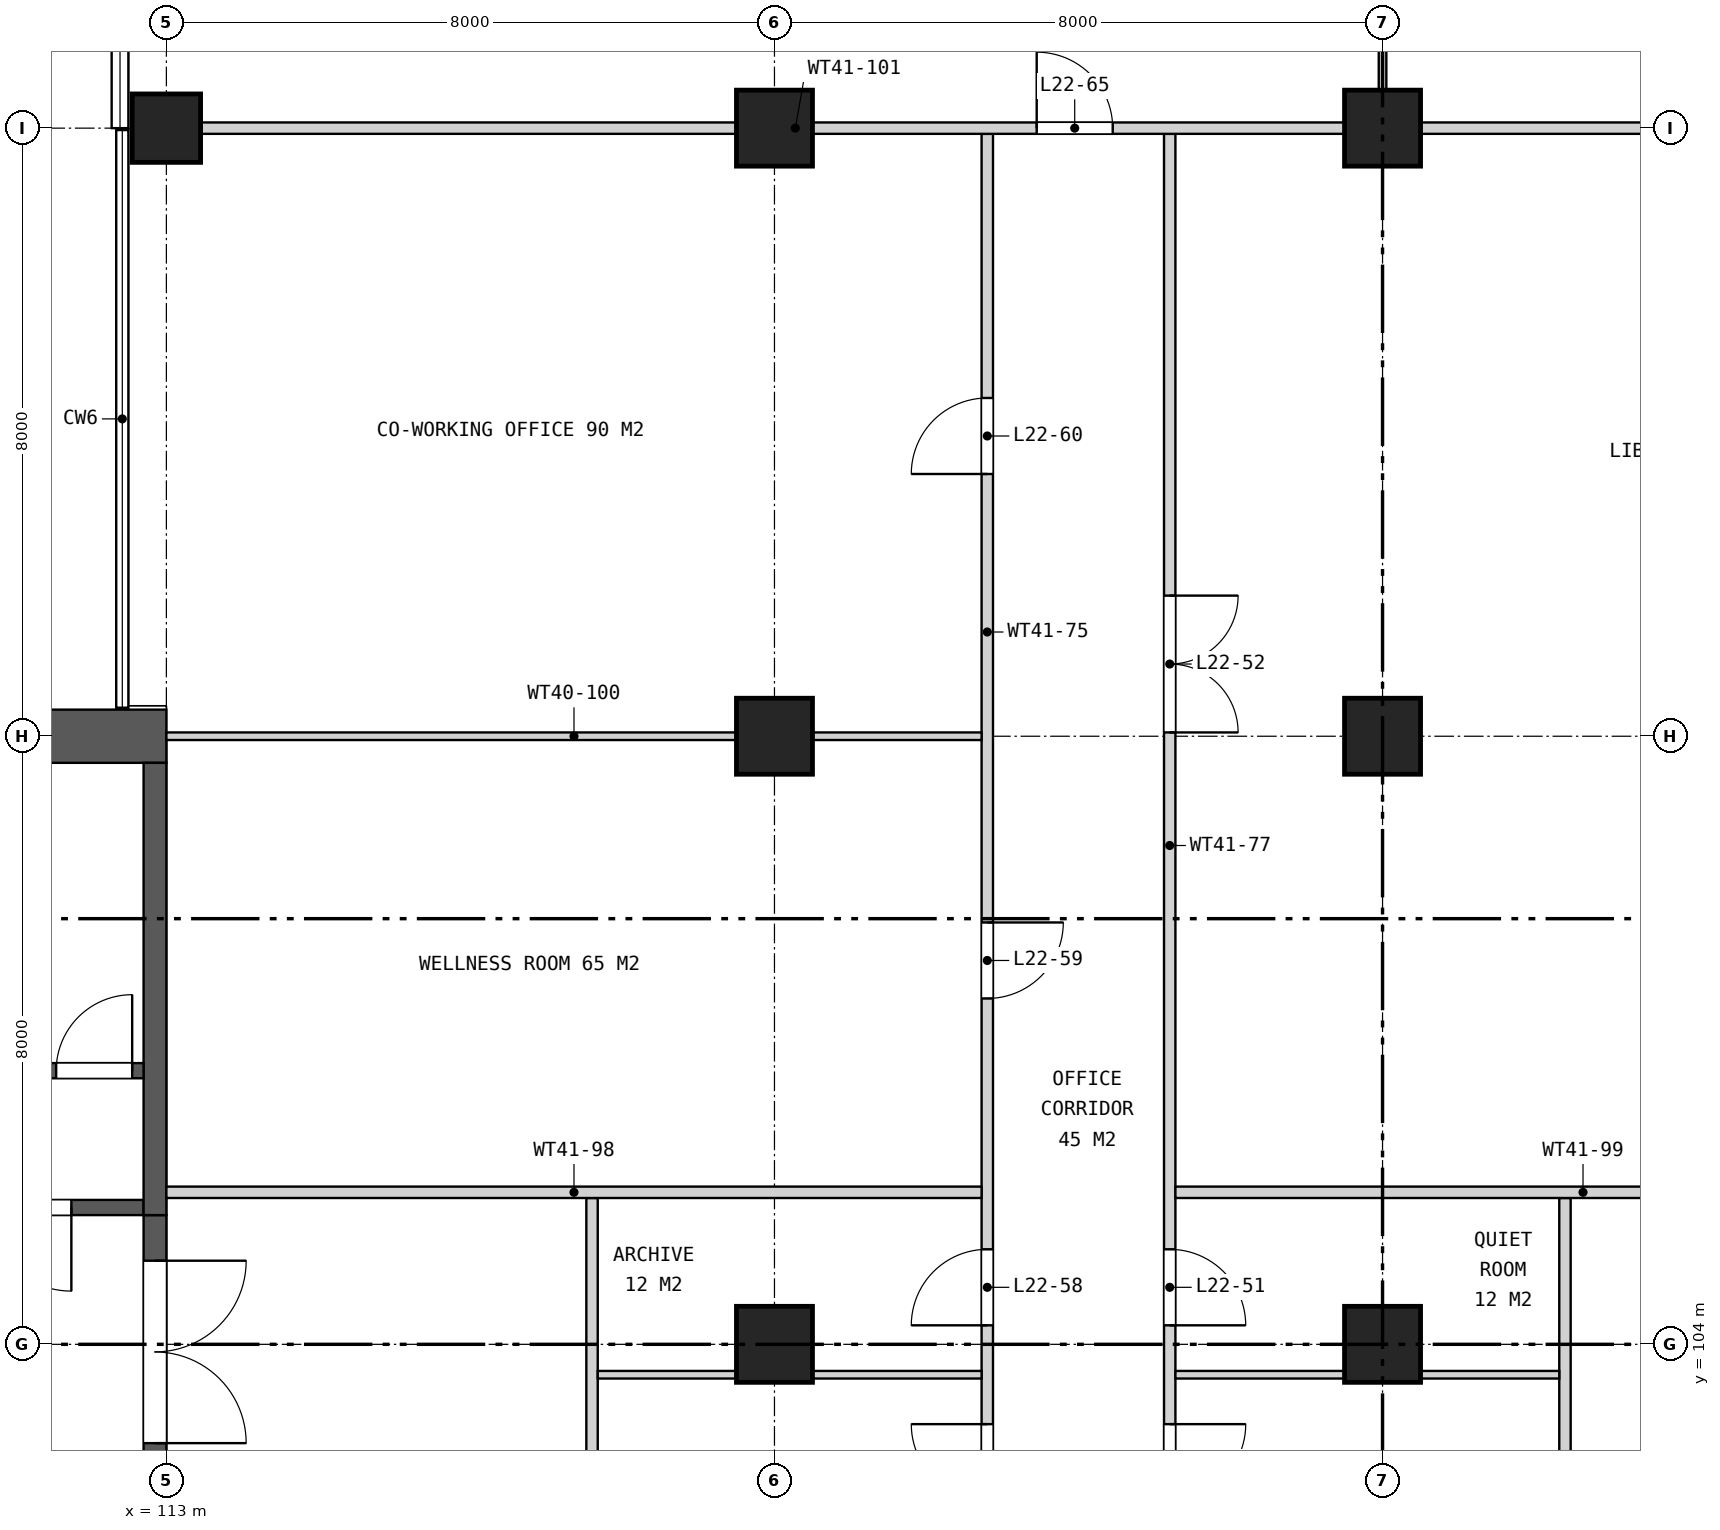
"""IFC4 building model, lengths in metres.
Left out: names, types, materials, properties, quantities, classifications, styles, units other than length and angle.
Written with IfcOpenShell. Run it as: python <this file> out.ifc"""

import sys

from ifc_helpers import new_model, si_unit, direction, frame, frame_2d, origin, origin_2d, place, context, subcontext, project, spatial, rectangle, extrude, element, fill, save


model = new_model("IFC4")
c1 = context("Model", 3, precision=1e-05, world=origin(), true_north=direction((0.0, 1.0)))
c2 = subcontext(c1, "Body", "Model", "MODEL_VIEW")
j1 = project(units=[si_unit("LENGTHUNIT", "METRE"), si_unit("PLANEANGLEUNIT", "RADIAN")], contexts=[c1])
p1 = place(None, origin())
s1 = spatial("IfcSite", under=j1, at=p1, CompositionType="ELEMENT")
p2 = place(p1, origin())
s2 = spatial("IfcBuilding", under=s1, at=p2, CompositionType="ELEMENT")
p3 = place(p2, frame((0.0, 0.0, 112.7)))
s3 = spatial("IfcBuildingStorey", under=s2, at=p3, CompositionType="ELEMENT", Elevation=112.7)
p4 = place(p3, frame((113.0, 120.0, 0.0), z_axis=(0.0, 0.0, 1.0), x_axis=(1.0, 0.0, 0.0)))
e1 = element("IfcColumn", 1, at=p4, inside=s3, PredefinedType="COLUMN", context=c2, shape_type="SweptSolid", body=[
    extrude(rectangle(XDim=0.9, YDim=0.9, at=origin_2d()), origin(), (0.0, 0.0, 1.0), 4.2),
])
for number, where, z_axis, x_axis in (
    (2, (121.0, 104.0, 0.0), (0.0, 0.0, 1.0), (1.0, 0.0, 0.0)),
    (3, (121.0, 112.0, 0.0), (0.0, 0.0, 1.0), (1.0, 0.0, 0.0)),
    (4, (121.0, 120.0, 0.0), (0.0, 0.0, 1.0), (1.0, 0.0, 0.0)),
    (5, (129.0, 104.0, 0.0), (0.0, 0.0, 1.0), (1.0, 0.0, 0.0)),
    (6, (129.0, 112.0, 0.0), (0.0, 0.0, 1.0), (1.0, 0.0, 0.0)),
    (7, (129.0, 120.0, 0.0), (0.0, 0.0, 1.0), (1.0, 0.0, 0.0)),
):
    element("IfcColumn", number, at=place(p3, frame(where, z_axis=z_axis, x_axis=x_axis)), inside=s3, PredefinedType="COLUMN", context=c2, shape_type="SweptSolid", body=[
        extrude(rectangle(XDim=1.0, YDim=1.0, at=origin_2d()), origin(), (0.0, 0.0, 1.0), 4.2),
    ])
p5 = place(p3, frame((113.0, 112.0, 0.0), z_axis=(0.0, 0.0, 1.0), x_axis=(-1.0, 0.0, 0.0)))
e8 = element("IfcWall", 8, at=p5, inside=s3, PredefinedType="SHEAR", context=c2, shape_type="SweptSolid", body=[
    extrude(rectangle(XDim=7.1, YDim=0.7, at=frame_2d((3.55, 0.0))), origin(), (0.0, 0.0, 1.0), 4.2),
])
p6 = place(p3, frame((112.85, 105.7, 0.0), z_axis=(0.0, 0.0, 1.0), x_axis=(0.0, -1.0, 0.0)))
e9 = element("IfcWall", 9, at=p6, inside=s3, PredefinedType="SHEAR", context=c2, shape_type="SweptSolid", body=[
    extrude(rectangle(XDim=11.4, YDim=0.3, at=frame_2d((5.7, 0.0))), origin(), (0.0, 0.0, 1.0), 4.2),
])
p7 = place(p6, frame((0.6, 0.0, 0.0)))
e10 = element("IfcOpeningElement", 10, at=p7, cuts=e9, PredefinedType="OPENING", context=c2, shape_type="SweptSolid", body=[
    extrude(rectangle(XDim=2.4, YDim=2.4, at=frame_2d((1.2, 1.2))), frame((0.0, 0.16, 0.0), z_axis=(0.0, -1.0, 0.0), x_axis=(1.0, 0.0, 0.0)), (0.0, 0.0, 1.0), 0.32),
])
p8 = place(p6, frame((4.5, 0.0, 0.0)))
e11 = element("IfcOpeningElement", 11, at=p8, cuts=e9, PredefinedType="OPENING", context=c2, shape_type="SweptSolid", body=[
    extrude(rectangle(XDim=2.4, YDim=2.4, at=frame_2d((1.2, 1.2))), frame((0.0, 0.16, 0.0), z_axis=(0.0, -1.0, 0.0), x_axis=(1.0, 0.0, 0.0)), (0.0, 0.0, 1.0), 0.32),
])
p9 = place(p6, frame((8.4, 0.0, 0.0)))
e12 = element("IfcOpeningElement", 12, at=p9, cuts=e9, PredefinedType="OPENING", context=c2, shape_type="SweptSolid", body=[
    extrude(rectangle(XDim=2.4, YDim=2.4, at=frame_2d((1.2, 1.2))), frame((0.0, 0.16, 0.0), z_axis=(0.0, -1.0, 0.0), x_axis=(1.0, 0.0, 0.0)), (0.0, 0.0, 1.0), 0.32),
])
p10 = place(p3, frame((112.7, 105.8, 0.0), z_axis=(0.0, 0.0, 1.0), x_axis=(-1.0, 0.0, 0.0)))
e13 = element("IfcWall", 13, at=p10, inside=s3, PredefinedType="SHEAR", context=c2, shape_type="SweptSolid", body=[
    extrude(rectangle(XDim=15.35, YDim=0.2, at=frame_2d((7.675, 0.0))), origin(), (0.0, 0.0, 1.0), 4.2),
])
p11 = place(p10, frame((0.95, 0.0, 0.0)))
e14 = element("IfcOpeningElement", 14, at=p11, cuts=e13, PredefinedType="OPENING", context=c2, shape_type="SweptSolid", body=[
    extrude(rectangle(XDim=1.1, YDim=2.1, at=frame_2d((0.55, 1.05))), frame((0.0, 0.11, 0.0), z_axis=(0.0, -1.0, 0.0), x_axis=(1.0, 0.0, 0.0)), (0.0, 0.0, 1.0), 0.22),
])
p12 = place(p3, frame((112.85, 111.65, 0.0), z_axis=(0.0, 0.0, 1.0), x_axis=(0.0, -1.0, 0.0)))
e15 = element("IfcWall", 15, at=p12, inside=s3, PredefinedType="SHEAR", context=c2, shape_type="SweptSolid", body=[
    extrude(rectangle(XDim=5.95, YDim=0.3, at=frame_2d((2.975, 0.0))), origin(), (0.0, 0.0, 1.0), 4.2),
])
p13 = place(p3, frame((112.7, 107.6, 0.0), z_axis=(0.0, 0.0, 1.0), x_axis=(-1.0, 0.0, 0.0)))
e16 = element("IfcWall", 16, at=p13, inside=s3, PredefinedType="SHEAR", context=c2, shape_type="SweptSolid", body=[
    extrude(rectangle(XDim=6.8, YDim=0.2, at=frame_2d((3.4, 0.0))), origin(), (0.0, 0.0, 1.0), 4.2),
])
p14 = place(p13, frame((0.15, 0.0, 0.0)))
e17 = element("IfcOpeningElement", 17, at=p14, cuts=e16, PredefinedType="OPENING", context=c2, shape_type="SweptSolid", body=[
    extrude(rectangle(XDim=1.0, YDim=2.1, at=frame_2d((0.5, 1.05))), frame((0.0, 0.11, 0.0), z_axis=(0.0, -1.0, 0.0), x_axis=(1.0, 0.0, 0.0)), (0.0, 0.0, 1.0), 0.22),
])
p15 = place(p3, frame((118.6, 101.2, 0.0), z_axis=(0.0, 0.0, 1.0), x_axis=(0.0, 1.0, 0.0)))
e18 = element("IfcWall", 18, at=p15, inside=s3, PredefinedType="PARTITIONING", context=c2, shape_type="SweptSolid", body=[
    extrude(rectangle(XDim=4.725, YDim=0.15, at=frame_2d((2.363, 0.0))), origin(), (0.0, 0.0, 1.0), 3.437),
])
p16 = place(p3, frame((123.8, 101.2, 0.0), z_axis=(0.0, 0.0, 1.0), x_axis=(0.0, 1.0, 0.0)))
e19 = element("IfcWall", 19, at=p16, inside=s3, PredefinedType="PARTITIONING", context=c2, shape_type="SweptSolid", body=[
    extrude(rectangle(XDim=18.725, YDim=0.15, at=frame_2d((9.363, 0.0))), origin(), (0.0, 0.0, 1.0), 3.437),
])
p17 = place(p16, frame((0.75, 0.0, 0.0)))
e20 = element("IfcOpeningElement", 20, at=p17, cuts=e19, PredefinedType="OPENING", context=c2, shape_type="SweptSolid", body=[
    extrude(rectangle(XDim=1.0, YDim=2.1, at=frame_2d((0.5, 1.05))), frame((0.0, 0.085, 0.0), z_axis=(0.0, -1.0, 0.0), x_axis=(1.0, 0.0, 0.0)), (0.0, 0.0, 1.0), 0.17),
])
p18 = place(p16, frame((3.05, 0.0, 0.0)))
e21 = element("IfcOpeningElement", 21, at=p18, cuts=e19, PredefinedType="OPENING", context=c2, shape_type="SweptSolid", body=[
    extrude(rectangle(XDim=1.0, YDim=2.1, at=frame_2d((0.5, 1.05))), frame((0.0, 0.085, 0.0), z_axis=(0.0, -1.0, 0.0), x_axis=(1.0, 0.0, 0.0)), (0.0, 0.0, 1.0), 0.17),
])
p19 = place(p16, frame((7.35, 0.0, 0.0)))
e22 = element("IfcOpeningElement", 22, at=p19, cuts=e19, PredefinedType="OPENING", context=c2, shape_type="SweptSolid", body=[
    extrude(rectangle(XDim=1.0, YDim=2.1, at=frame_2d((0.5, 1.05))), frame((0.0, 0.085, 0.0), z_axis=(0.0, -1.0, 0.0), x_axis=(1.0, 0.0, 0.0)), (0.0, 0.0, 1.0), 0.17),
])
p20 = place(p16, frame((14.25, 0.0, 0.0)))
e23 = element("IfcOpeningElement", 23, at=p20, cuts=e19, PredefinedType="OPENING", context=c2, shape_type="SweptSolid", body=[
    extrude(rectangle(XDim=1.0, YDim=2.1, at=frame_2d((0.5, 1.05))), frame((0.0, 0.085, 0.0), z_axis=(0.0, -1.0, 0.0), x_axis=(1.0, 0.0, 0.0)), (0.0, 0.0, 1.0), 0.17),
])
p21 = place(p3, frame((126.2, 101.2, 0.0), z_axis=(0.0, 0.0, 1.0), x_axis=(0.0, 1.0, 0.0)))
e24 = element("IfcWall", 24, at=p21, inside=s3, PredefinedType="PARTITIONING", context=c2, shape_type="SweptSolid", body=[
    extrude(rectangle(XDim=18.725, YDim=0.15, at=frame_2d((9.363, 0.0))), origin(), (0.0, 0.0, 1.0), 3.437),
])
p22 = place(p21, frame((0.75, 0.0, 0.0)))
e25 = element("IfcOpeningElement", 25, at=p22, cuts=e24, PredefinedType="OPENING", context=c2, shape_type="SweptSolid", body=[
    extrude(rectangle(XDim=1.0, YDim=2.1, at=frame_2d((0.5, 1.05))), frame((0.0, 0.085, 0.0), z_axis=(0.0, -1.0, 0.0), x_axis=(1.0, 0.0, 0.0)), (0.0, 0.0, 1.0), 0.17),
])
p23 = place(p21, frame((3.05, 0.0, 0.0)))
e26 = element("IfcOpeningElement", 26, at=p23, cuts=e24, PredefinedType="OPENING", context=c2, shape_type="SweptSolid", body=[
    extrude(rectangle(XDim=1.0, YDim=2.1, at=frame_2d((0.5, 1.05))), frame((0.0, 0.085, 0.0), z_axis=(0.0, -1.0, 0.0), x_axis=(1.0, 0.0, 0.0)), (0.0, 0.0, 1.0), 0.17),
])
p24 = place(p21, frame((10.85, 0.0, 0.0)))
e27 = element("IfcOpeningElement", 27, at=p24, cuts=e24, PredefinedType="OPENING", context=c2, shape_type="SweptSolid", body=[
    extrude(rectangle(XDim=1.8, YDim=2.1, at=frame_2d((0.9, 1.05))), frame((0.0, 0.085, 0.0), z_axis=(0.0, -1.0, 0.0), x_axis=(1.0, 0.0, 0.0)), (0.0, 0.0, 1.0), 0.17),
])
p25 = place(p3, frame((129.0, 120.075, 0.0), z_axis=(0.0, 0.0, 1.0), x_axis=(0.0, 1.0, 0.0)))
e28 = element("IfcWall", 28, at=p25, inside=s3, PredefinedType="PARTITIONING", context=c2, shape_type="SweptSolid", body=[
    extrude(rectangle(XDim=8.345, YDim=0.1, at=frame_2d((4.172, 0.0))), origin(), (0.0, 0.0, 1.0), 3.437),
])
p26 = place(p25, frame((3.55, 0.0, 0.0)))
e29 = element("IfcOpeningElement", 29, at=p26, cuts=e28, PredefinedType="OPENING", context=c2, shape_type="SweptSolid", body=[
    extrude(rectangle(XDim=0.9, YDim=2.1, at=frame_2d((0.45, 1.05))), frame((0.0, 0.06, 0.0), z_axis=(0.0, -1.0, 0.0), x_axis=(1.0, 0.0, 0.0)), (0.0, 0.0, 1.0), 0.12),
])
p27 = place(p3, frame((131.4, 101.2, 0.0), z_axis=(0.0, 0.0, 1.0), x_axis=(0.0, 1.0, 0.0)))
e30 = element("IfcWall", 30, at=p27, inside=s3, PredefinedType="PARTITIONING", context=c2, shape_type="SweptSolid", body=[
    extrude(rectangle(XDim=4.725, YDim=0.15, at=frame_2d((2.363, 0.0))), origin(), (0.0, 0.0, 1.0), 3.437),
])
for number, where, z_axis, x_axis in (
    (31, (118.675, 103.6, 0.0), (0.0, 0.0, 1.0), (1.0, 0.0, 0.0)),
    (32, (126.275, 103.6, 0.0), (0.0, 0.0, 1.0), (1.0, 0.0, 0.0)),
):
    element("IfcWall", number, at=place(p3, frame(where, z_axis=z_axis, x_axis=x_axis)), inside=s3, PredefinedType="PARTITIONING", context=c2, shape_type="SweptSolid", body=[
        extrude(rectangle(XDim=5.05, YDim=0.1, at=frame_2d((2.525, 0.0))), origin(), (0.0, 0.0, 1.0), 3.437),
    ])
for number, where, z_axis, x_axis in (
    (33, (113.0, 106.0, 0.0), (0.0, 0.0, 1.0), (1.0, 0.0, 0.0)),
    (34, (126.275, 106.0, 0.0), (0.0, 0.0, 1.0), (1.0, 0.0, 0.0)),
):
    element("IfcWall", number, at=place(p3, frame(where, z_axis=z_axis, x_axis=x_axis)), inside=s3, PredefinedType="PARTITIONING", context=c2, shape_type="SweptSolid", body=[
        extrude(rectangle(XDim=10.725, YDim=0.15, at=frame_2d((5.363, 0.0))), origin(), (0.0, 0.0, 1.0), 3.437),
    ])
p28 = place(p3, frame((113.0, 112.0, 0.0), z_axis=(0.0, 0.0, 1.0), x_axis=(1.0, 0.0, 0.0)))
e35 = element("IfcWall", 35, at=p28, inside=s3, PredefinedType="PARTITIONING", context=c2, shape_type="SweptSolid", body=[
    extrude(rectangle(XDim=10.725, YDim=0.1, at=frame_2d((5.363, 0.0))), origin(), (0.0, 0.0, 1.0), 3.437),
])
p29 = place(p3, frame((112.58, 120.0, 0.0), z_axis=(0.0, 0.0, 1.0), x_axis=(1.0, 0.0, 0.0)))
e36 = element("IfcWall", 36, at=p29, inside=s3, PredefinedType="PARTITIONING", context=c2, shape_type="SweptSolid", body=[
    extrude(rectangle(XDim=24.84, YDim=0.15, at=frame_2d((12.42, 0.0))), origin(), (0.0, 0.0, 1.0), 3.437),
])
p30 = place(p29, frame((11.87, 0.0, 0.0)))
e37 = element("IfcOpeningElement", 37, at=p30, cuts=e36, PredefinedType="OPENING", context=c2, shape_type="SweptSolid", body=[
    extrude(rectangle(XDim=1.0, YDim=2.1, at=frame_2d((0.5, 1.05))), frame((0.0, 0.085, 0.0), z_axis=(0.0, -1.0, 0.0), x_axis=(1.0, 0.0, 0.0)), (0.0, 0.0, 1.0), 0.17),
])
p31 = place(p7, origin())
e38 = element("IfcDoor", 38, at=p31, inside=s3, OperationType="DOUBLE_DOOR_SINGLE_SWING", PredefinedType="DOOR", context=c2, shape_type="SweptSolid", body=[
    extrude(rectangle(XDim=2.4, YDim=2.4, at=frame_2d((1.2, 1.2))), frame((0.0, 0.025, 0.0), z_axis=(0.0, -1.0, 0.0), x_axis=(1.0, 0.0, 0.0)), (0.0, 0.0, 1.0), 0.05),
])
fill(e10, e38)
p32 = place(p11, origin())
e39 = element("IfcDoor", 39, at=p32, inside=s3, OperationType="SINGLE_SWING_LEFT", PredefinedType="DOOR", context=c2, shape_type="SweptSolid", body=[
    extrude(rectangle(XDim=1.1, YDim=2.1, at=frame_2d((0.55, 1.05))), frame((0.0, 0.025, 0.0), z_axis=(0.0, -1.0, 0.0), x_axis=(1.0, 0.0, 0.0)), (0.0, 0.0, 1.0), 0.05),
])
fill(e14, e39)
p33 = place(p14, frame((1.0, 0.0, 0.0), z_axis=(0.0, 0.0, 1.0), x_axis=(-1.0, 0.0, 0.0)))
e40 = element("IfcDoor", 40, at=p33, inside=s3, OperationType="SINGLE_SWING_RIGHT", PredefinedType="DOOR", context=c2, shape_type="SweptSolid", body=[
    extrude(rectangle(XDim=1.0, YDim=2.1, at=frame_2d((0.5, 1.05))), frame((0.0, 0.025, 0.0), z_axis=(0.0, -1.0, 0.0), x_axis=(1.0, 0.0, 0.0)), (0.0, 0.0, 1.0), 0.05),
])
fill(e17, e40)
p34 = place(p22, frame((1.0, 0.0, 0.0), z_axis=(0.0, 0.0, 1.0), x_axis=(-1.0, 0.0, 0.0)))
e41 = element("IfcDoor", 41, at=p34, inside=s3, OperationType="SINGLE_SWING_LEFT", PredefinedType="DOOR", context=c2, shape_type="SweptSolid", body=[
    extrude(rectangle(XDim=1.0, YDim=2.1, at=frame_2d((0.5, 1.05))), frame((0.0, 0.025, 0.0), z_axis=(0.0, -1.0, 0.0), x_axis=(1.0, 0.0, 0.0)), (0.0, 0.0, 1.0), 0.05),
])
fill(e25, e41)
p35 = place(p23, frame((1.0, 0.0, 0.0), z_axis=(0.0, 0.0, 1.0), x_axis=(-1.0, 0.0, 0.0)))
e42 = element("IfcDoor", 42, at=p35, inside=s3, OperationType="SINGLE_SWING_RIGHT", PredefinedType="DOOR", context=c2, shape_type="SweptSolid", body=[
    extrude(rectangle(XDim=1.0, YDim=2.1, at=frame_2d((0.5, 1.05))), frame((0.0, 0.025, 0.0), z_axis=(0.0, -1.0, 0.0), x_axis=(1.0, 0.0, 0.0)), (0.0, 0.0, 1.0), 0.05),
])
fill(e26, e42)
p36 = place(p24, frame((1.8, 0.0, 0.0), z_axis=(0.0, 0.0, 1.0), x_axis=(-1.0, 0.0, 0.0)))
e43 = element("IfcDoor", 43, at=p36, inside=s3, OperationType="DOUBLE_DOOR_SINGLE_SWING", PredefinedType="DOOR", context=c2, shape_type="SweptSolid", body=[
    extrude(rectangle(XDim=1.8, YDim=2.1, at=frame_2d((0.9, 1.05))), frame((0.0, 0.025, 0.0), z_axis=(0.0, -1.0, 0.0), x_axis=(1.0, 0.0, 0.0)), (0.0, 0.0, 1.0), 0.05),
])
fill(e27, e43)
p37 = place(p17, origin())
e44 = element("IfcDoor", 44, at=p37, inside=s3, OperationType="SINGLE_SWING_RIGHT", PredefinedType="DOOR", context=c2, shape_type="SweptSolid", body=[
    extrude(rectangle(XDim=1.0, YDim=2.1, at=frame_2d((0.5, 1.05))), frame((0.0, 0.025, 0.0), z_axis=(0.0, -1.0, 0.0), x_axis=(1.0, 0.0, 0.0)), (0.0, 0.0, 1.0), 0.05),
])
fill(e20, e44)
p38 = place(p18, origin())
e45 = element("IfcDoor", 45, at=p38, inside=s3, OperationType="SINGLE_SWING_LEFT", PredefinedType="DOOR", context=c2, shape_type="SweptSolid", body=[
    extrude(rectangle(XDim=1.0, YDim=2.1, at=frame_2d((0.5, 1.05))), frame((0.0, 0.025, 0.0), z_axis=(0.0, -1.0, 0.0), x_axis=(1.0, 0.0, 0.0)), (0.0, 0.0, 1.0), 0.05),
])
fill(e21, e45)
p39 = place(p19, frame((1.0, 0.0, 0.0), z_axis=(0.0, 0.0, 1.0), x_axis=(-1.0, 0.0, 0.0)))
e46 = element("IfcDoor", 46, at=p39, inside=s3, OperationType="SINGLE_SWING_LEFT", PredefinedType="DOOR", context=c2, shape_type="SweptSolid", body=[
    extrude(rectangle(XDim=1.0, YDim=2.1, at=frame_2d((0.5, 1.05))), frame((0.0, 0.025, 0.0), z_axis=(0.0, -1.0, 0.0), x_axis=(1.0, 0.0, 0.0)), (0.0, 0.0, 1.0), 0.05),
])
fill(e22, e46)
p40 = place(p20, origin())
e47 = element("IfcDoor", 47, at=p40, inside=s3, OperationType="SINGLE_SWING_LEFT", PredefinedType="DOOR", context=c2, shape_type="SweptSolid", body=[
    extrude(rectangle(XDim=1.0, YDim=2.1, at=frame_2d((0.5, 1.05))), frame((0.0, 0.025, 0.0), z_axis=(0.0, -1.0, 0.0), x_axis=(1.0, 0.0, 0.0)), (0.0, 0.0, 1.0), 0.05),
])
fill(e23, e47)
p41 = place(p30, origin())
e48 = element("IfcDoor", 48, at=p41, inside=s3, OperationType="SINGLE_SWING_LEFT", PredefinedType="DOOR", context=c2, shape_type="SweptSolid", body=[
    extrude(rectangle(XDim=1.0, YDim=2.1, at=frame_2d((0.5, 1.05))), frame((0.0, 0.025, 0.0), z_axis=(0.0, -1.0, 0.0), x_axis=(1.0, 0.0, 0.0)), (0.0, 0.0, 1.0), 0.05),
])
fill(e37, e48)
save(model, sys.argv[1])
